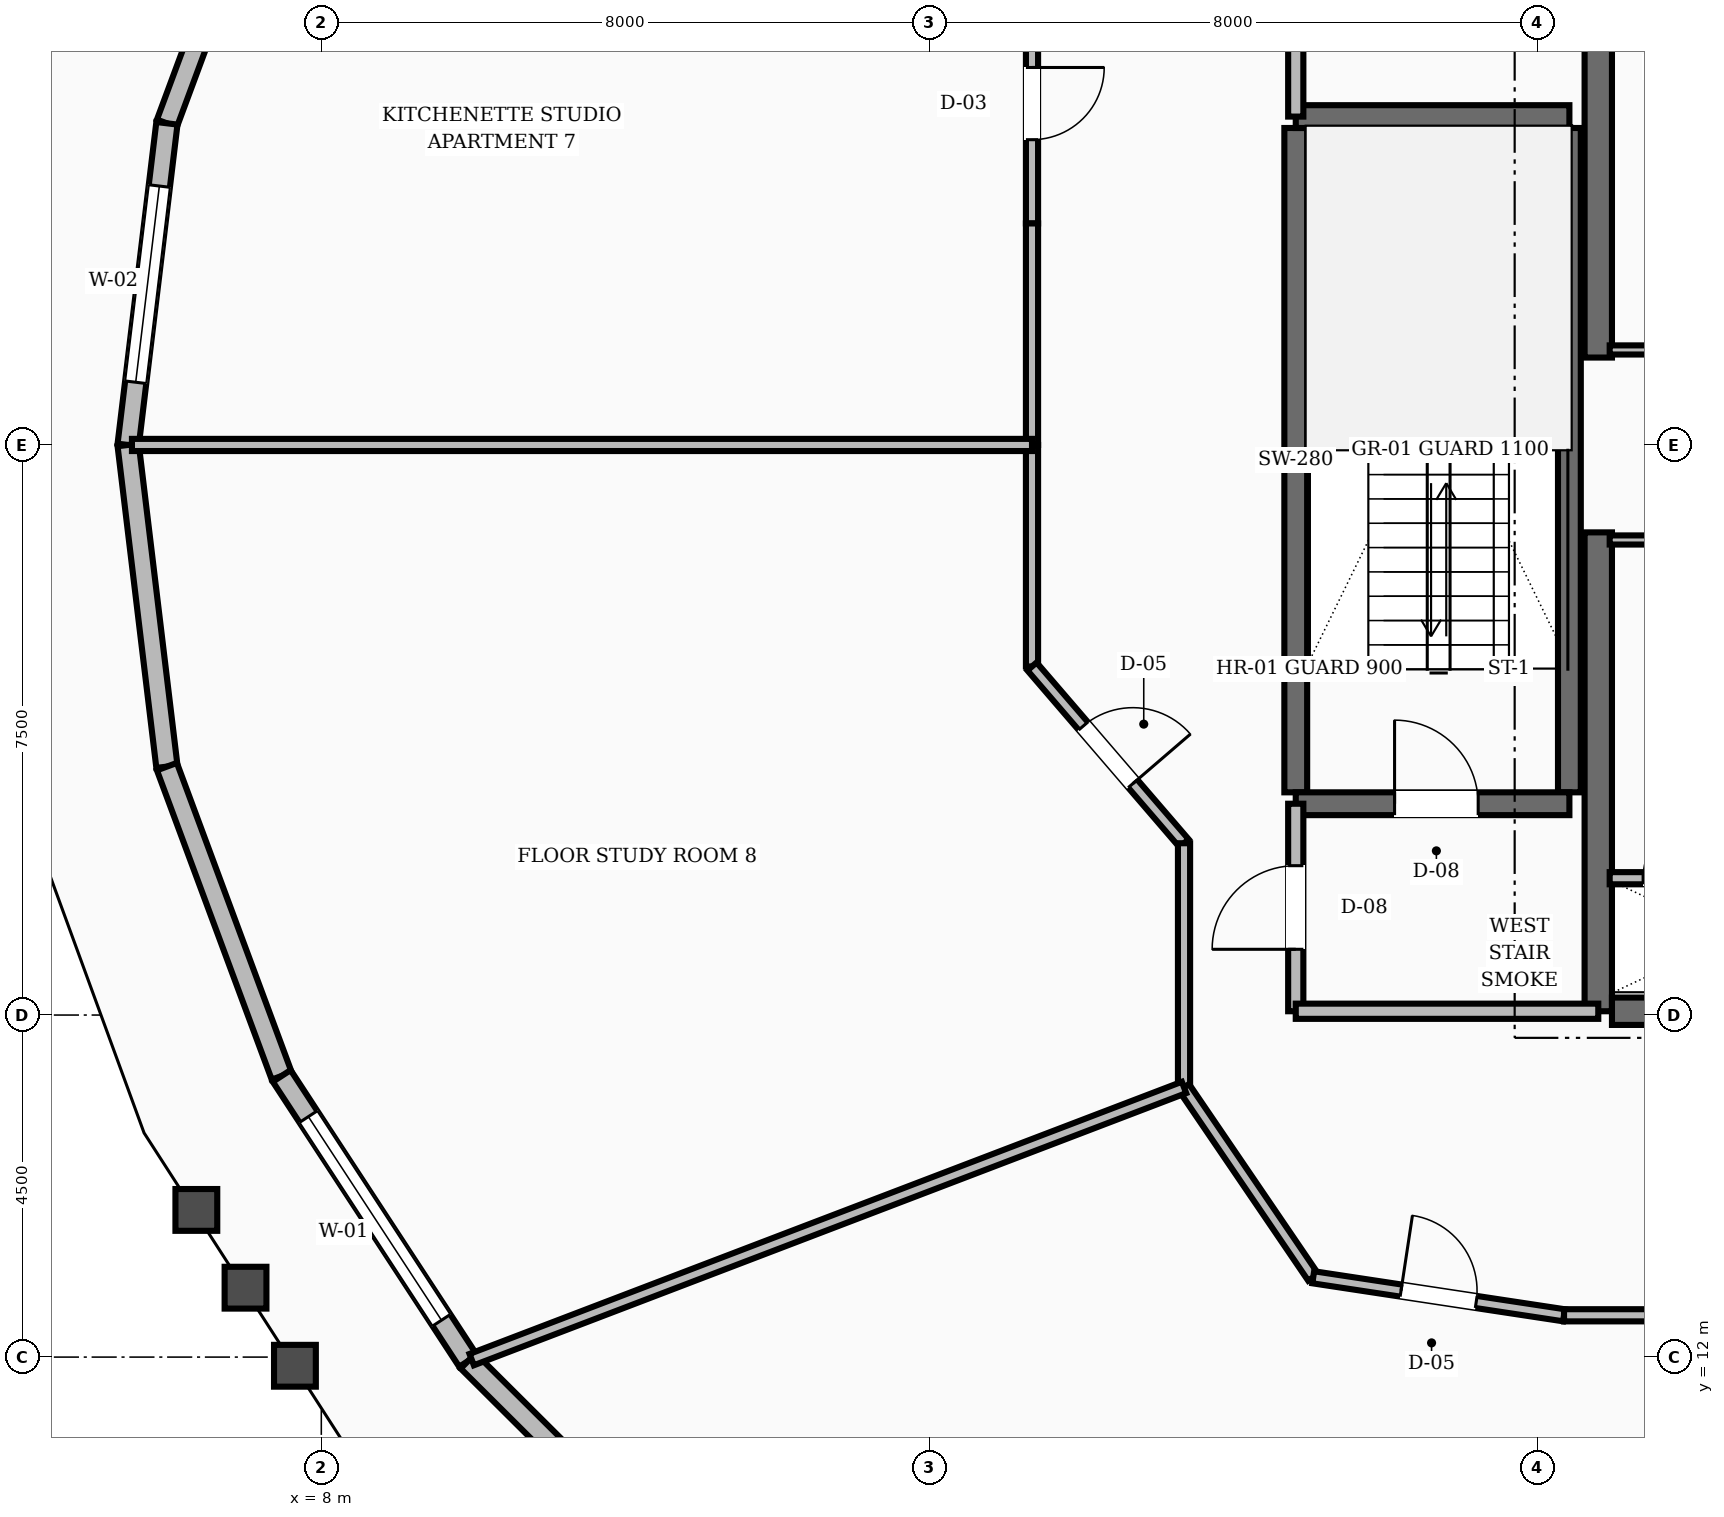
"""IFC4 building model, lengths in metres.
Left out: names, types, materials, properties, quantities, classifications, styles, units other than length and angle.
Written with IfcOpenShell. Run it as: python <this file> out.ifc"""

import sys

from ifc_helpers import new_model, si_unit, direction, frame, frame_2d, origin, place, context, subcontext, project, spatial, rectangle, extrude, element, fill, save


model = new_model("IFC4")
c1 = context("Model", 3, precision=1e-05, world=origin(), true_north=direction((0.0, 1.0)))
c2 = subcontext(c1, "Body", "Model", "MODEL_VIEW")
j1 = project(units=[si_unit("LENGTHUNIT", "METRE"), si_unit("PLANEANGLEUNIT", "RADIAN")], contexts=[c1])
p1 = place(None, origin())
s1 = spatial("IfcSite", under=j1, at=p1, CompositionType="ELEMENT")
p2 = place(p1, origin())
s2 = spatial("IfcBuilding", under=s1, at=p2, CompositionType="ELEMENT")
p3 = place(p2, frame((0.0, 0.0, 135.2)))
s3 = spatial("IfcBuildingStorey", under=s2, at=p3, CompositionType="ELEMENT", Elevation=135.2)
for number, where, z_axis, x_axis in (
    (1, (24.8, 16.55, 0.0), (0.0, 0.0, 1.0), (0.0, 1.0, 0.0)),
    (2, (24.8, 25.15, 0.0), (0.0, 0.0, 1.0), (0.0, 1.0, 0.0)),
):
    element("IfcWall", number, at=place(p3, frame(where, z_axis=z_axis, x_axis=x_axis)), inside=s3, PredefinedType="SHEAR", context=c2, shape_type="SweptSolid", body=[
        extrude(rectangle(XDim=6.3, YDim=0.36, at=frame_2d((3.15, 0.0))), origin(), (0.0, 0.0, 1.0), 3.6),
    ])
p4 = place(p3, frame((24.98, 16.55, 0.0), z_axis=(0.0, 0.0, 1.0), x_axis=(1.0, 0.0, 0.0)))
e3 = element("IfcWall", 3, at=p4, inside=s3, PredefinedType="SHEAR", context=c2, shape_type="SweptSolid", body=[
    extrude(rectangle(XDim=3.22, YDim=0.36, at=frame_2d((1.61, 0.0))), origin(), (0.0, 0.0, 1.0), 3.6),
])
for number, where, z_axis, x_axis in (
    (4, (20.82, 19.43, 0.0), (0.0, 0.0, 1.0), (0.0, 1.0, 0.0)),
    (5, (24.42, 19.43, 0.0), (0.0, 0.0, 1.0), (0.0, 1.0, 0.0)),
):
    element("IfcWall", number, at=place(p3, frame(where, z_axis=z_axis, x_axis=x_axis)), inside=s3, PredefinedType="SHEAR", context=c2, shape_type="SweptSolid", body=[
        extrude(rectangle(XDim=8.74, YDim=0.3, at=frame_2d((4.37, 0.0))), origin(), (0.0, 0.0, 1.0), 3.6),
    ])
p5 = place(p3, frame((20.82, 19.28, 0.0), z_axis=(0.0, 0.0, 1.0), x_axis=(1.0, 0.0, 0.0)))
e6 = element("IfcWall", 6, at=p5, inside=s3, PredefinedType="SHEAR", context=c2, shape_type="SweptSolid", body=[
    extrude(rectangle(XDim=3.6, YDim=0.3, at=frame_2d((1.8, 0.0))), origin(), (0.0, 0.0, 1.0), 3.6),
])
p6 = place(p5, frame((1.3, 0.0, 0.0)))
e7 = element("IfcOpeningElement", 7, at=p6, cuts=e6, PredefinedType="OPENING", context=c2, shape_type="SweptSolid", body=[
    extrude(rectangle(XDim=1.1, YDim=2.1, at=frame_2d((0.55, 1.05))), frame((0.0, 0.16, 0.0), z_axis=(0.0, -1.0, 0.0), x_axis=(1.0, 0.0, 0.0)), (0.0, 0.0, 1.0), 0.32),
])
p7 = place(p3, frame((20.82, 28.32, 0.0), z_axis=(0.0, 0.0, 1.0), x_axis=(1.0, 0.0, 0.0)))
e8 = element("IfcWall", 8, at=p7, inside=s3, PredefinedType="SHEAR", context=c2, shape_type="SweptSolid", body=[
    extrude(rectangle(XDim=3.6, YDim=0.3, at=frame_2d((1.8, 0.0))), origin(), (0.0, 0.0, 1.0), 3.6),
])
p8 = place(p3, frame((7.479, 32.301, 0.0), z_axis=(0.0, 0.0, 1.0), x_axis=(-0.347959140817, -0.937509699321, 0.0)))
e9 = element("IfcWall", 9, at=p8, inside=s3, PredefinedType="STANDARD", context=c2, shape_type="SweptSolid", body=[
    extrude(rectangle(XDim=4.34, YDim=0.28, at=frame_2d((2.17, 0.0))), origin(), (0.0, 0.0, 1.0), 2.82),
])
p9 = place(p3, frame((5.969, 28.232, 0.0), z_axis=(0.0, 0.0, 1.0), x_axis=(-0.119655655781, -0.992815453163, 0.0)))
e10 = element("IfcWall", 10, at=p9, inside=s3, PredefinedType="STANDARD", context=c2, shape_type="SweptSolid", body=[
    extrude(rectangle(XDim=4.262, YDim=0.28, at=frame_2d((2.131, 0.0))), origin(), (0.0, 0.0, 1.0), 2.82),
])
p10 = place(p9, frame((0.831, 0.0, 0.8)))
e11 = element("IfcOpeningElement", 11, at=p10, cuts=e10, PredefinedType="OPENING", context=c2, shape_type="SweptSolid", body=[
    extrude(rectangle(XDim=2.6, YDim=1.65, at=frame_2d((1.3, 0.825))), frame((0.0, 0.15, 0.0), z_axis=(0.0, -1.0, 0.0), x_axis=(1.0, 0.0, 0.0)), (0.0, 0.0, 1.0), 0.3),
])
p11 = place(p3, frame((5.459, 24.0, 0.0), z_axis=(0.0, 0.0, 1.0), x_axis=(0.119655655781, -0.992815453163, 0.0)))
e12 = element("IfcWall", 12, at=p11, inside=s3, PredefinedType="STANDARD", context=c2, shape_type="SweptSolid", body=[
    extrude(rectangle(XDim=4.262, YDim=0.28, at=frame_2d((2.131, 0.0))), origin(), (0.0, 0.0, 1.0), 2.82),
])
p12 = place(p3, frame((5.969, 19.768, 0.0), z_axis=(0.0, 0.0, 1.0), x_axis=(0.347959140817, -0.937509699321, 0.0)))
e13 = element("IfcWall", 13, at=p12, inside=s3, PredefinedType="STANDARD", context=c2, shape_type="SweptSolid", body=[
    extrude(rectangle(XDim=4.34, YDim=0.28, at=frame_2d((2.17, 0.0))), origin(), (0.0, 0.0, 1.0), 2.82),
])
p13 = place(p3, frame((7.479, 15.699, 0.0), z_axis=(0.0, 0.0, 1.0), x_axis=(0.547360926274, -0.83689665813, 0.0)))
e14 = element("IfcWall", 14, at=p13, inside=s3, PredefinedType="STANDARD", context=c2, shape_type="SweptSolid", body=[
    extrude(rectangle(XDim=4.481, YDim=0.28, at=frame_2d((2.24, 0.0))), origin(), (0.0, 0.0, 1.0), 2.82),
])
p14 = place(p13, frame((0.64, 0.0, 0.8)))
e15 = element("IfcOpeningElement", 15, at=p14, cuts=e14, PredefinedType="OPENING", context=c2, shape_type="SweptSolid", body=[
    extrude(rectangle(XDim=3.2, YDim=1.65, at=frame_2d((1.6, 0.825))), frame((0.0, 0.15, 0.0), z_axis=(0.0, -1.0, 0.0), x_axis=(1.0, 0.0, 0.0)), (0.0, 0.0, 1.0), 0.3),
])
p15 = place(p3, frame((9.932, 11.949, 0.0), z_axis=(0.0, 0.0, 1.0), x_axis=(0.708572716766, -0.705637800188, 0.0)))
e16 = element("IfcWall", 16, at=p15, inside=s3, PredefinedType="STANDARD", context=c2, shape_type="SweptSolid", body=[
    extrude(rectangle(XDim=4.658, YDim=0.28, at=frame_2d((2.329, 0.0))), origin(), (0.0, 0.0, 1.0), 2.82),
])
p16 = place(p3, frame((20.82, 16.55, 0.0), z_axis=(0.0, 0.0, 1.0), x_axis=(0.0, 1.0, 0.0)))
e17 = element("IfcWall", 17, at=p16, inside=s3, PredefinedType="SOLIDWALL", context=c2, shape_type="SweptSolid", body=[
    extrude(rectangle(XDim=2.73, YDim=0.2, at=frame_2d((1.365, 0.0))), origin(), (0.0, 0.0, 1.0), 2.8),
])
p17 = place(p16, frame((0.815, 0.0, 0.0)))
e18 = element("IfcOpeningElement", 18, at=p17, cuts=e17, PredefinedType="OPENING", context=c2, shape_type="SweptSolid", body=[
    extrude(rectangle(XDim=1.1, YDim=2.1, at=frame_2d((0.55, 1.05))), frame((0.0, 0.11, 0.0), z_axis=(0.0, -1.0, 0.0), x_axis=(1.0, 0.0, 0.0)), (0.0, 0.0, 1.0), 0.22),
])
p18 = place(p3, frame((20.82, 16.55, 0.0), z_axis=(0.0, 0.0, 1.0), x_axis=(1.0, 0.0, 0.0)))
e19 = element("IfcWall", 19, at=p18, inside=s3, PredefinedType="SOLIDWALL", context=c2, shape_type="SweptSolid", body=[
    extrude(rectangle(XDim=3.98, YDim=0.2, at=frame_2d((1.99, 0.0))), origin(), (0.0, 0.0, 1.0), 2.8),
])
p19 = place(p3, frame((20.82, 28.32, 0.0), z_axis=(0.0, 0.0, 1.0), x_axis=(0.0, 1.0, 0.0)))
e20 = element("IfcWall", 20, at=p19, inside=s3, PredefinedType="SOLIDWALL", context=c2, shape_type="SweptSolid", body=[
    extrude(rectangle(XDim=3.13, YDim=0.2, at=frame_2d((1.565, 0.0))), origin(), (0.0, 0.0, 1.0), 2.8),
])
p20 = place(p19, frame((1.09, 0.0, 0.0)))
e21 = element("IfcOpeningElement", 21, at=p20, cuts=e20, PredefinedType="OPENING", context=c2, shape_type="SweptSolid", body=[
    extrude(rectangle(XDim=0.95, YDim=2.1, at=frame_2d((0.475, 1.05))), frame((0.0, 0.11, 0.0), z_axis=(0.0, -1.0, 0.0), x_axis=(1.0, 0.0, 0.0)), (0.0, 0.0, 1.0), 0.22),
])
p21 = place(p3, frame((24.95, 18.3, 0.0), z_axis=(0.0, 0.0, 1.0), x_axis=(1.0, 0.0, 0.0)))
e22 = element("IfcWall", 22, at=p21, inside=s3, PredefinedType="SOLIDWALL", context=c2, shape_type="SweptSolid", body=[
    extrude(rectangle(XDim=3.2, YDim=0.16, at=frame_2d((1.6, 0.0))), origin(), (0.0, 0.0, 1.0), 2.8),
])
p22 = place(p21, frame((0.44, 0.0, 0.0)))
e23 = element("IfcOpeningElement", 23, at=p22, cuts=e22, PredefinedType="OPENING", context=c2, shape_type="SweptSolid", body=[
    extrude(rectangle(XDim=0.86, YDim=2.05, at=frame_2d((0.43, 1.025))), frame((0.0, 0.09, 0.0), z_axis=(0.0, -1.0, 0.0), x_axis=(1.0, 0.0, 0.0)), (0.0, 0.0, 1.0), 0.18),
])
p23 = place(p3, frame((24.95, 25.25, 0.0), z_axis=(0.0, 0.0, 1.0), x_axis=(1.0, 0.0, 0.0)))
e24 = element("IfcWall", 24, at=p23, inside=s3, PredefinedType="PARTITIONING", context=c2, shape_type="SweptSolid", body=[
    extrude(rectangle(XDim=3.2, YDim=0.12, at=frame_2d((1.6, 0.0))), origin(), (0.0, 0.0, 1.0), 2.8),
])
p24 = place(p23, frame((1.125, 0.0, 0.0)))
e25 = element("IfcOpeningElement", 25, at=p24, cuts=e24, PredefinedType="OPENING", context=c2, shape_type="SweptSolid", body=[
    extrude(rectangle(XDim=0.95, YDim=2.1, at=frame_2d((0.475, 1.05))), frame((0.0, 0.07, 0.0), z_axis=(0.0, -1.0, 0.0), x_axis=(1.0, 0.0, 0.0)), (0.0, 0.0, 1.0), 0.14),
])
p25 = place(p3, frame((24.95, 22.75, 0.0), z_axis=(0.0, 0.0, 1.0), x_axis=(1.0, 0.0, 0.0)))
e26 = element("IfcWall", 26, at=p25, inside=s3, PredefinedType="PARTITIONING", context=c2, shape_type="SweptSolid", body=[
    extrude(rectangle(XDim=3.2, YDim=0.12, at=frame_2d((1.6, 0.0))), origin(), (0.0, 0.0, 1.0), 2.8),
])
p26 = place(p25, frame((1.125, 0.0, 0.0)))
e27 = element("IfcOpeningElement", 27, at=p26, cuts=e26, PredefinedType="OPENING", context=c2, shape_type="SweptSolid", body=[
    extrude(rectangle(XDim=0.95, YDim=2.1, at=frame_2d((0.475, 1.05))), frame((0.0, 0.07, 0.0), z_axis=(0.0, -1.0, 0.0), x_axis=(1.0, 0.0, 0.0)), (0.0, 0.0, 1.0), 0.14),
])
p27 = place(p3, frame((17.35, 30.068, 0.0), z_axis=(0.0, 0.0, 1.0), x_axis=(0.0, -1.0, 0.0)))
e28 = element("IfcWall", 28, at=p27, inside=s3, PredefinedType="SOLIDWALL", context=c2, shape_type="SweptSolid", body=[
    extrude(rectangle(XDim=3.154, YDim=0.16, at=frame_2d((1.577, 0.0))), origin(), (0.0, 0.0, 1.0), 2.8),
])
p28 = place(p27, frame((1.102, 0.0, 0.0)))
e29 = element("IfcOpeningElement", 29, at=p28, cuts=e28, PredefinedType="OPENING", context=c2, shape_type="SweptSolid", body=[
    extrude(rectangle(XDim=0.95, YDim=2.1, at=frame_2d((0.475, 1.05))), frame((0.0, 0.09, 0.0), z_axis=(0.0, -1.0, 0.0), x_axis=(1.0, 0.0, 0.0)), (0.0, 0.0, 1.0), 0.18),
])
for number, where, z_axis, x_axis in (
    (30, (17.35, 26.914, 0.0), (0.0, 0.0, 1.0), (0.0, -1.0, 0.0)),
    (31, (17.35, 24.0, 0.0), (0.0, 0.0, 1.0), (0.0, -1.0, 0.0)),
):
    element("IfcWall", number, at=place(p3, frame(where, z_axis=z_axis, x_axis=x_axis)), inside=s3, PredefinedType="SOLIDWALL", context=c2, shape_type="SweptSolid", body=[
        extrude(rectangle(XDim=2.914, YDim=0.16, at=frame_2d((1.457, 0.0))), origin(), (0.0, 0.0, 1.0), 2.8),
    ])
p29 = place(p3, frame((17.35, 21.086, 0.0), z_axis=(0.0, 0.0, 1.0), x_axis=(0.652022797448, -0.758199361388, 0.0)))
e32 = element("IfcWall", 32, at=p29, inside=s3, PredefinedType="SOLIDWALL", context=c2, shape_type="SweptSolid", body=[
    extrude(rectangle(XDim=3.067, YDim=0.16, at=frame_2d((1.534, 0.0))), origin(), (0.0, 0.0, 1.0), 2.8),
])
p30 = place(p29, frame((1.034, 0.0, 0.0)))
e33 = element("IfcOpeningElement", 33, at=p30, cuts=e32, PredefinedType="OPENING", context=c2, shape_type="SweptSolid", body=[
    extrude(rectangle(XDim=1.0, YDim=2.1, at=frame_2d((0.5, 1.05))), frame((0.0, 0.09, 0.0), z_axis=(0.0, -1.0, 0.0), x_axis=(1.0, 0.0, 0.0)), (0.0, 0.0, 1.0), 0.18),
])
p31 = place(p3, frame((19.35, 18.76, 0.0), z_axis=(0.0, 0.0, 1.0), x_axis=(0.0, -1.0, 0.0)))
e34 = element("IfcWall", 34, at=p31, inside=s3, PredefinedType="SOLIDWALL", context=c2, shape_type="SweptSolid", body=[
    extrude(rectangle(XDim=3.213, YDim=0.16, at=frame_2d((1.606, 0.0))), origin(), (0.0, 0.0, 1.0), 2.8),
])
p32 = place(p3, frame((19.35, 15.548, 0.0), z_axis=(0.0, 0.0, 1.0), x_axis=(0.562674669208, -0.826678423955, 0.0)))
e35 = element("IfcWall", 35, at=p32, inside=s3, PredefinedType="SOLIDWALL", context=c2, shape_type="SweptSolid", body=[
    extrude(rectangle(XDim=3.021, YDim=0.16, at=frame_2d((1.511, 0.0))), origin(), (0.0, 0.0, 1.0), 2.8),
])
p33 = place(p3, frame((21.05, 13.05, 0.0), z_axis=(0.0, 0.0, 1.0), x_axis=(0.988710906508, -0.149835721217, 0.0)))
e36 = element("IfcWall", 36, at=p33, inside=s3, PredefinedType="SOLIDWALL", context=c2, shape_type="SweptSolid", body=[
    extrude(rectangle(XDim=3.337, YDim=0.16, at=frame_2d((1.668, 0.0))), origin(), (0.0, 0.0, 1.0), 2.8),
])
p34 = place(p33, frame((1.168, 0.0, 0.0)))
e37 = element("IfcOpeningElement", 37, at=p34, cuts=e36, PredefinedType="OPENING", context=c2, shape_type="SweptSolid", body=[
    extrude(rectangle(XDim=1.0, YDim=2.1, at=frame_2d((0.5, 1.05))), frame((0.0, 0.09, 0.0), z_axis=(0.0, -1.0, 0.0), x_axis=(1.0, 0.0, 0.0)), (0.0, 0.0, 1.0), 0.18),
])
p35 = place(p3, frame((24.349, 12.55, 0.0), z_axis=(0.0, 0.0, 1.0), x_axis=(1.0, 0.0, 0.0)))
e38 = element("IfcWall", 38, at=p35, inside=s3, PredefinedType="SOLIDWALL", context=c2, shape_type="SweptSolid", body=[
    extrude(rectangle(XDim=2.908, YDim=0.16, at=frame_2d((1.454, 0.0))), origin(), (0.0, 0.0, 1.0), 2.8),
])
p36 = place(p3, frame((17.35, 24.0, 0.0), z_axis=(0.0, 0.0, 1.0), x_axis=(-1.0, 0.0, 0.0)))
e39 = element("IfcWall", 39, at=p36, inside=s3, PredefinedType="SOLIDWALL", context=c2, shape_type="SweptSolid", body=[
    extrude(rectangle(XDim=11.841, YDim=0.16, at=frame_2d((5.921, 0.0))), origin(), (0.0, 0.0, 1.0), 2.8),
])
p37 = place(p3, frame((19.35, 15.548, 0.0), z_axis=(0.0, 0.0, 1.0), x_axis=(-0.93414110303, -0.356903908118, 0.0)))
e40 = element("IfcWall", 40, at=p37, inside=s3, PredefinedType="SOLIDWALL", context=c2, shape_type="SweptSolid", body=[
    extrude(rectangle(XDim=10.032, YDim=0.16, at=frame_2d((5.016, 0.0))), origin(), (0.0, 0.0, 1.0), 2.8),
])
p38 = place(p3, frame((27.257, 12.55, 0.0), z_axis=(0.0, 0.0, 1.0), x_axis=(-0.541525955259, -0.840684030882, 0.0)))
e41 = element("IfcWall", 41, at=p38, inside=s3, PredefinedType="SOLIDWALL", context=c2, shape_type="SweptSolid", body=[
    extrude(rectangle(XDim=9.552, YDim=0.16, at=frame_2d((4.776, 0.0))), origin(), (0.0, 0.0, 1.0), 2.8),
])
p39 = place(p10, origin())
e42 = element("IfcWindow", 42, at=p39, inside=s3, PartitioningType="SINGLE_PANEL", PredefinedType="WINDOW", context=c2, shape_type="SweptSolid", body=[
    extrude(rectangle(XDim=2.6, YDim=1.65, at=frame_2d((1.3, 0.825))), frame((0.0, 0.03, 0.0), z_axis=(0.0, -1.0, 0.0), x_axis=(1.0, 0.0, 0.0)), (0.0, 0.0, 1.0), 0.06),
])
fill(e11, e42)
p40 = place(p14, origin())
e43 = element("IfcWindow", 43, at=p40, inside=s3, PartitioningType="SINGLE_PANEL", PredefinedType="WINDOW", context=c2, shape_type="SweptSolid", body=[
    extrude(rectangle(XDim=3.2, YDim=1.65, at=frame_2d((1.6, 0.825))), frame((0.0, 0.03, 0.0), z_axis=(0.0, -1.0, 0.0), x_axis=(1.0, 0.0, 0.0)), (0.0, 0.0, 1.0), 0.06),
])
fill(e15, e43)
p41 = place(p6, origin())
e44 = element("IfcDoor", 44, at=p41, inside=s3, OperationType="SINGLE_SWING_LEFT", PredefinedType="DOOR", context=c2, shape_type="SweptSolid", body=[
    extrude(rectangle(XDim=1.1, YDim=2.1, at=frame_2d((0.55, 1.05))), frame((0.0, 0.025, 0.0), z_axis=(0.0, -1.0, 0.0), x_axis=(1.0, 0.0, 0.0)), (0.0, 0.0, 1.0), 0.05),
])
fill(e7, e44)
p42 = place(p17, origin())
e45 = element("IfcDoor", 45, at=p42, inside=s3, OperationType="SINGLE_SWING_LEFT", PredefinedType="DOOR", context=c2, shape_type="SweptSolid", body=[
    extrude(rectangle(XDim=1.1, YDim=2.1, at=frame_2d((0.55, 1.05))), frame((0.0, 0.025, 0.0), z_axis=(0.0, -1.0, 0.0), x_axis=(1.0, 0.0, 0.0)), (0.0, 0.0, 1.0), 0.05),
])
fill(e18, e45)
p43 = place(p22, origin())
e46 = element("IfcDoor", 46, at=p43, inside=s3, OperationType="SINGLE_SWING_RIGHT", PredefinedType="TRAPDOOR", context=c2, shape_type="SweptSolid", body=[
    extrude(rectangle(XDim=0.86, YDim=2.05, at=frame_2d((0.43, 1.025))), frame((0.0, 0.025, 0.0), z_axis=(0.0, -1.0, 0.0), x_axis=(1.0, 0.0, 0.0)), (0.0, 0.0, 1.0), 0.05),
])
fill(e23, e46)
p44 = place(p28, origin())
e47 = element("IfcDoor", 47, at=p44, inside=s3, OperationType="SINGLE_SWING_LEFT", PredefinedType="DOOR", context=c2, shape_type="SweptSolid", body=[
    extrude(rectangle(XDim=0.95, YDim=2.1, at=frame_2d((0.475, 1.05))), frame((0.0, 0.025, 0.0), z_axis=(0.0, -1.0, 0.0), x_axis=(1.0, 0.0, 0.0)), (0.0, 0.0, 1.0), 0.05),
])
fill(e29, e47)
p45 = place(p30, origin())
e48 = element("IfcDoor", 48, at=p45, inside=s3, OperationType="SINGLE_SWING_RIGHT", PredefinedType="DOOR", context=c2, shape_type="SweptSolid", body=[
    extrude(rectangle(XDim=1.0, YDim=2.1, at=frame_2d((0.5, 1.05))), frame((0.0, 0.025, 0.0), z_axis=(0.0, -1.0, 0.0), x_axis=(1.0, 0.0, 0.0)), (0.0, 0.0, 1.0), 0.05),
])
fill(e33, e48)
p46 = place(p34, origin())
e49 = element("IfcDoor", 49, at=p46, inside=s3, OperationType="SINGLE_SWING_LEFT", PredefinedType="DOOR", context=c2, shape_type="SweptSolid", body=[
    extrude(rectangle(XDim=1.0, YDim=2.1, at=frame_2d((0.5, 1.05))), frame((0.0, 0.025, 0.0), z_axis=(0.0, -1.0, 0.0), x_axis=(1.0, 0.0, 0.0)), (0.0, 0.0, 1.0), 0.05),
])
fill(e37, e49)
save(model, sys.argv[1])
